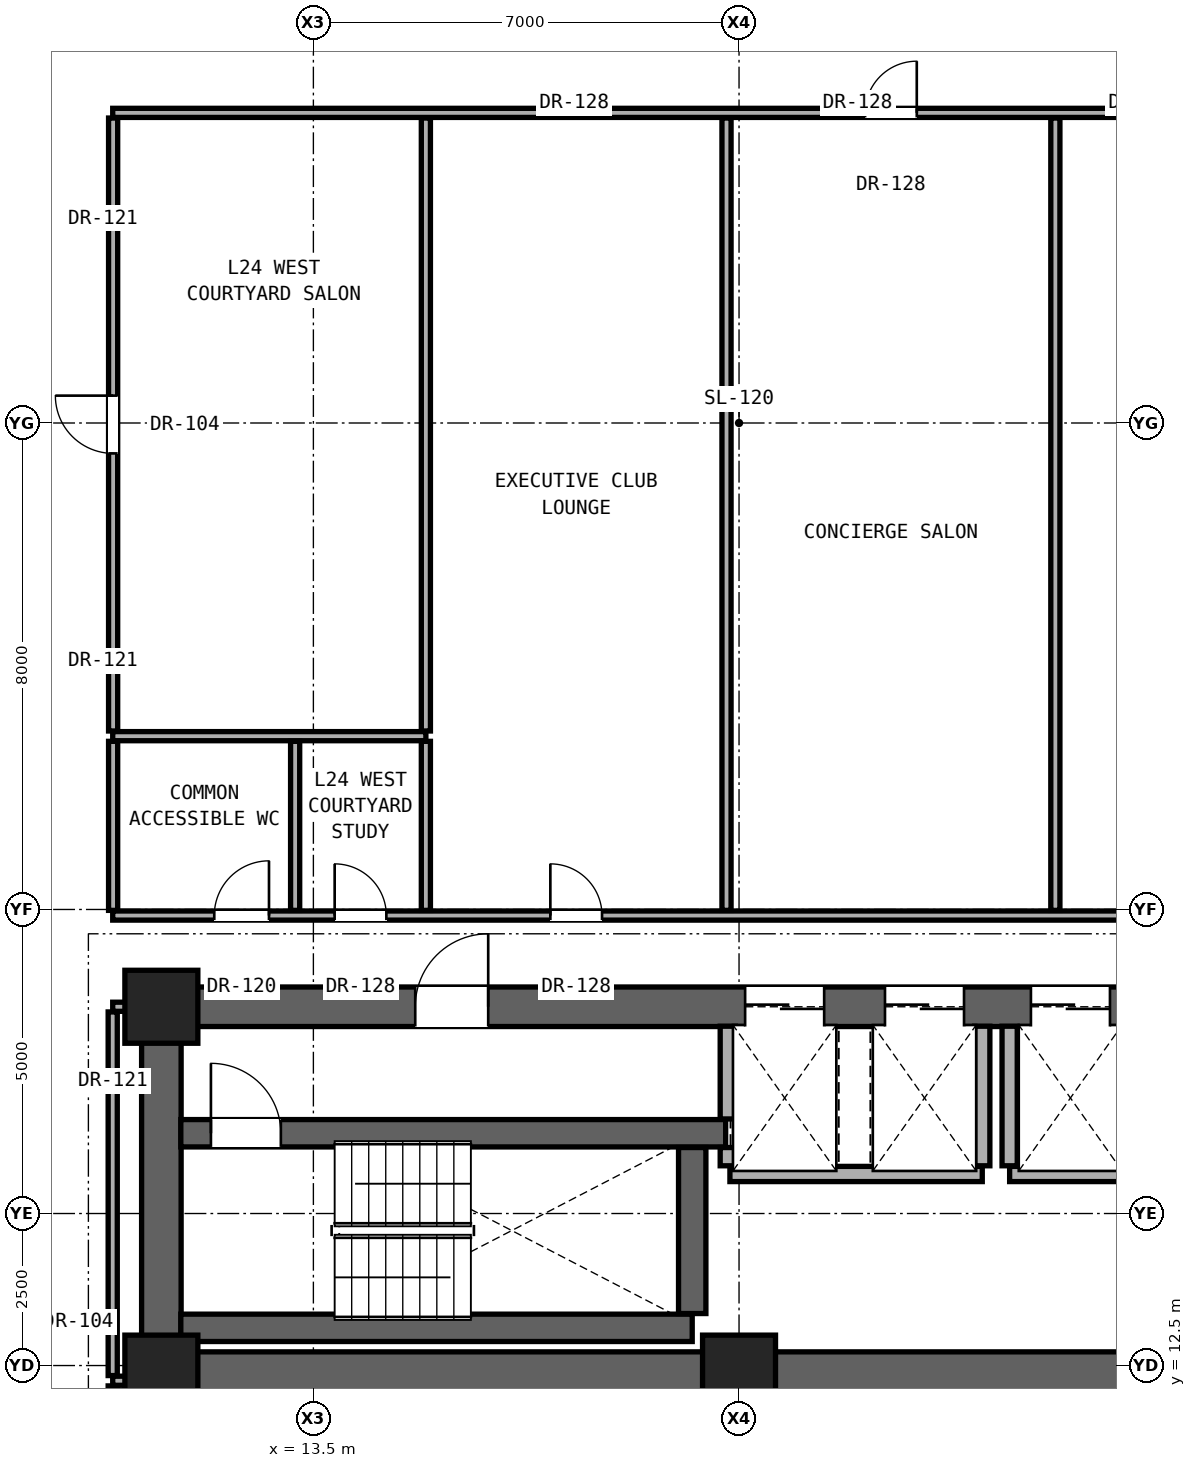
"""IFC4 building model, lengths in metres.
Left out: names, types, materials, properties, quantities, classifications, styles, units other than length and angle.
Written with IfcOpenShell. Run it as: python <this file> out.ifc"""

import sys

from ifc_helpers import new_model, si_unit, direction, frame, frame_2d, origin, origin_2d, place, context, subcontext, project, spatial, rectangle, extrude, element, fill, save


model = new_model("IFC4")
c1 = context("Model", 3, precision=1e-05, world=origin(), true_north=direction((0.0, 1.0)))
c2 = subcontext(c1, "Body", "Model", "MODEL_VIEW")
j1 = project(units=[si_unit("LENGTHUNIT", "METRE"), si_unit("PLANEANGLEUNIT", "RADIAN")], contexts=[c1])
p1 = place(None, origin())
s1 = spatial("IfcSite", under=j1, at=p1, CompositionType="ELEMENT")
p2 = place(p1, origin())
s2 = spatial("IfcBuilding", under=s1, at=p2, CompositionType="ELEMENT")
p3 = place(p2, frame((0.0, 0.0, 88.4)))
s3 = spatial("IfcBuildingStorey", under=s2, at=p3, CompositionType="ELEMENT", Elevation=88.4)
for number, where, z_axis, x_axis in (
    (1, (11.0, 12.4, 0.0), (0.0, 0.0, 1.0), (1.0, 0.0, 0.0)),
    (2, (20.5, 12.4, 0.0), (0.0, 0.0, 1.0), (1.0, 0.0, 0.0)),
    (3, (11.0, 18.4, 0.0), (0.0, 0.0, 1.0), (1.0, 0.0, 0.0)),
):
    element("IfcColumn", number, at=place(p3, frame(where, z_axis=z_axis, x_axis=x_axis)), inside=s3, PredefinedType="COLUMN", context=c2, shape_type="SweptSolid", body=[
        extrude(rectangle(XDim=1.2, YDim=1.2, at=origin_2d()), origin(), (0.0, 0.0, 1.0), 3.3),
    ])
p4 = place(p3, frame((11.0, 12.4, 0.0), z_axis=(0.0, 0.0, 1.0), x_axis=(1.0, 0.0, 0.0)))
e4 = element("IfcWall", 4, at=p4, inside=s3, PredefinedType="SHEAR", context=c2, shape_type="SweptSolid", body=[
    extrude(rectangle(XDim=19.0, YDim=0.65, at=frame_2d((9.5, 0.0))), origin(), (0.0, 0.0, 1.0), 3.08),
])
p5 = place(p3, frame((11.0, 12.4, 0.0), z_axis=(0.0, 0.0, 1.0), x_axis=(0.0, 1.0, 0.0)))
e5 = element("IfcWall", 5, at=p5, inside=s3, PredefinedType="SHEAR", context=c2, shape_type="SweptSolid", body=[
    extrude(rectangle(XDim=6.0, YDim=0.65, at=frame_2d((3.0, 0.0))), origin(), (0.0, 0.0, 1.0), 3.08),
])
p6 = place(p3, frame((11.0, 18.4, 0.0), z_axis=(0.0, 0.0, 1.0), x_axis=(1.0, 0.0, 0.0)))
e6 = element("IfcWall", 6, at=p6, inside=s3, PredefinedType="SHEAR", context=c2, shape_type="SweptSolid", body=[
    extrude(rectangle(XDim=19.0, YDim=0.65, at=frame_2d((9.5, 0.0))), origin(), (0.0, 0.0, 1.0), 3.08),
])
p7 = place(p6, frame((4.175, 0.0, 0.0)))
e7 = element("IfcOpeningElement", 7, at=p7, cuts=e6, PredefinedType="OPENING", context=c2, shape_type="SweptSolid", body=[
    extrude(rectangle(XDim=1.2, YDim=2.25, at=frame_2d((0.6, 1.125))), frame((0.0, 0.335, 0.0), z_axis=(0.0, -1.0, 0.0), x_axis=(1.0, 0.0, 0.0)), (0.0, 0.0, 1.0), 0.67),
])
p8 = place(p6, frame((9.6, 0.0, 0.0)))
e8 = element("IfcOpeningElement", 8, at=p8, cuts=e6, PredefinedType="OPENING", context=c2, shape_type="SweptSolid", body=[
    extrude(rectangle(XDim=1.3, YDim=2.3, at=frame_2d((0.65, 1.15))), frame((0.0, 0.335, 0.0), z_axis=(0.0, -1.0, 0.0), x_axis=(1.0, 0.0, 0.0)), (0.0, 0.0, 1.0), 0.67),
])
p9 = place(p6, frame((11.9, 0.0, 0.0)))
e9 = element("IfcOpeningElement", 9, at=p9, cuts=e6, PredefinedType="OPENING", context=c2, shape_type="SweptSolid", body=[
    extrude(rectangle(XDim=1.3, YDim=2.3, at=frame_2d((0.65, 1.15))), frame((0.0, 0.335, 0.0), z_axis=(0.0, -1.0, 0.0), x_axis=(1.0, 0.0, 0.0)), (0.0, 0.0, 1.0), 0.67),
])
p10 = place(p6, frame((14.3, 0.0, 0.0)))
e10 = element("IfcOpeningElement", 10, at=p10, cuts=e6, PredefinedType="OPENING", context=c2, shape_type="SweptSolid", body=[
    extrude(rectangle(XDim=1.3, YDim=2.3, at=frame_2d((0.65, 1.15))), frame((0.0, 0.335, 0.0), z_axis=(0.0, -1.0, 0.0), x_axis=(1.0, 0.0, 0.0)), (0.0, 0.0, 1.0), 0.67),
])
p11 = place(p6, frame((16.6, 0.0, 0.0)))
e11 = element("IfcOpeningElement", 11, at=p11, cuts=e6, PredefinedType="OPENING", context=c2, shape_type="SweptSolid", body=[
    extrude(rectangle(XDim=1.3, YDim=2.3, at=frame_2d((0.65, 1.15))), frame((0.0, 0.335, 0.0), z_axis=(0.0, -1.0, 0.0), x_axis=(1.0, 0.0, 0.0)), (0.0, 0.0, 1.0), 0.67),
])
p12 = place(p3, frame((10.2, 12.25, 0.0), z_axis=(0.0, 0.0, 1.0), x_axis=(1.0, 0.0, 0.0)))
e12 = element("IfcWall", 12, at=p12, inside=s3, PredefinedType="PARTITIONING", context=c2, shape_type="SweptSolid", body=[
    extrude(rectangle(XDim=0.48, YDim=0.15, at=frame_2d((0.24, 0.0))), origin(), (0.0, 0.0, 1.0), 3.08),
])
p13 = place(p3, frame((11.32, 13.12, 0.0), z_axis=(0.0, 0.0, 1.0), x_axis=(1.0, 0.0, 0.0)))
e13 = element("IfcWall", 13, at=p13, inside=s3, PredefinedType="SHEAR", context=c2, shape_type="SweptSolid", body=[
    extrude(rectangle(XDim=8.41, YDim=0.45, at=frame_2d((4.205, 0.0))), origin(), (0.0, 0.0, 1.0), 3.08),
])
p14 = place(p3, frame((20.35, 15.65, 0.0), z_axis=(0.0, 0.0, 1.0), x_axis=(1.0, 0.0, 0.0)))
e14 = element("IfcWall", 14, at=p14, inside=s3, PredefinedType="SOLIDWALL", context=c2, shape_type="SweptSolid", body=[
    extrude(rectangle(XDim=4.15, YDim=0.25, at=frame_2d((2.075, 0.0))), origin(), (0.0, 0.0, 1.0), 3.08),
])
p15 = place(p3, frame((24.95, 15.65, 0.0), z_axis=(0.0, 0.0, 1.0), x_axis=(1.0, 0.0, 0.0)))
e15 = element("IfcWall", 15, at=p15, inside=s3, PredefinedType="SOLIDWALL", context=c2, shape_type="SweptSolid", body=[
    extrude(rectangle(XDim=4.25, YDim=0.25, at=frame_2d((2.125, 0.0))), origin(), (0.0, 0.0, 1.0), 3.08),
])
p16 = place(p3, frame((11.32, 16.32, 0.0), z_axis=(0.0, 0.0, 1.0), x_axis=(1.0, 0.0, 0.0)))
e16 = element("IfcWall", 16, at=p16, inside=s3, PredefinedType="SHEAR", context=c2, shape_type="SweptSolid", body=[
    extrude(rectangle(XDim=8.96, YDim=0.45, at=frame_2d((4.48, 0.0))), origin(), (0.0, 0.0, 1.0), 3.08),
])
p17 = place(p16, frame((0.495, 0.0, 0.0)))
e17 = element("IfcOpeningElement", 17, at=p17, cuts=e16, PredefinedType="OPENING", context=c2, shape_type="SweptSolid", body=[
    extrude(rectangle(XDim=1.15, YDim=2.2, at=frame_2d((0.575, 1.1))), frame((0.0, 0.235, 0.0), z_axis=(0.0, -1.0, 0.0), x_axis=(1.0, 0.0, 0.0)), (0.0, 0.0, 1.0), 0.47),
])
p18 = place(p3, frame((10.2, 18.4, 0.0), z_axis=(0.0, 0.0, 1.0), x_axis=(1.0, 0.0, 0.0)))
e18 = element("IfcWall", 18, at=p18, inside=s3, PredefinedType="PARTITIONING", context=c2, shape_type="SweptSolid", body=[
    extrude(rectangle(XDim=0.48, YDim=0.15, at=frame_2d((0.24, 0.0))), origin(), (0.0, 0.0, 1.0), 2.456),
])
p19 = place(p3, frame((10.2, 19.9, 0.0), z_axis=(0.0, 0.0, 1.0), x_axis=(1.0, 0.0, 0.0)))
e19 = element("IfcWall", 19, at=p19, inside=s3, PredefinedType="PARTITIONING", context=c2, shape_type="SweptSolid", body=[
    extrude(rectangle(XDim=20.6, YDim=0.15, at=frame_2d((10.3, 0.0))), origin(), (0.0, 0.0, 1.0), 2.124),
])
p20 = place(p19, frame((1.67, 0.0, 0.0)))
e20 = element("IfcOpeningElement", 20, at=p20, cuts=e19, PredefinedType="OPENING", context=c2, shape_type="SweptSolid", body=[
    extrude(rectangle(XDim=0.9, YDim=2.1, at=frame_2d((0.45, 1.05))), frame((0.0, 0.085, 0.0), z_axis=(0.0, -1.0, 0.0), x_axis=(1.0, 0.0, 0.0)), (0.0, 0.0, 1.0), 0.17),
])
p21 = place(p19, frame((3.65, 0.0, 0.0)))
e21 = element("IfcOpeningElement", 21, at=p21, cuts=e19, PredefinedType="OPENING", context=c2, shape_type="SweptSolid", body=[
    extrude(rectangle(XDim=0.85, YDim=2.01, at=frame_2d((0.425, 1.005))), frame((0.0, 0.085, 0.0), z_axis=(0.0, -1.0, 0.0), x_axis=(1.0, 0.0, 0.0)), (0.0, 0.0, 1.0), 0.17),
])
p22 = place(p19, frame((7.197, 0.0, 0.0)))
e22 = element("IfcOpeningElement", 22, at=p22, cuts=e19, PredefinedType="OPENING", context=c2, shape_type="SweptSolid", body=[
    extrude(rectangle(XDim=0.85, YDim=2.01, at=frame_2d((0.425, 1.005))), frame((0.0, 0.085, 0.0), z_axis=(0.0, -1.0, 0.0), x_axis=(1.0, 0.0, 0.0)), (0.0, 0.0, 1.0), 0.17),
])
p23 = place(p3, frame((10.2, 22.85, 0.0), z_axis=(0.0, 0.0, 1.0), x_axis=(1.0, 0.0, 0.0)))
e23 = element("IfcWall", 23, at=p23, inside=s3, PredefinedType="PARTITIONING", context=c2, shape_type="SweptSolid", body=[
    extrude(rectangle(XDim=5.15, YDim=0.15, at=frame_2d((2.575, 0.0))), origin(), (0.0, 0.0, 1.0), 2.124),
])
p24 = place(p3, frame((10.2, 33.1, 0.0), z_axis=(0.0, 0.0, 1.0), x_axis=(1.0, 0.0, 0.0)))
e24 = element("IfcWall", 24, at=p24, inside=s3, PredefinedType="PARTITIONING", context=c2, shape_type="SweptSolid", body=[
    extrude(rectangle(XDim=20.6, YDim=0.15, at=frame_2d((10.3, 0.0))), origin(), (0.0, 0.0, 1.0), 2.124),
])
p25 = place(p24, frame((12.373, 0.0, 0.0)))
e25 = element("IfcOpeningElement", 25, at=p25, cuts=e24, PredefinedType="OPENING", context=c2, shape_type="SweptSolid", body=[
    extrude(rectangle(XDim=0.85, YDim=2.01, at=frame_2d((0.425, 1.005))), frame((0.0, 0.085, 0.0), z_axis=(0.0, -1.0, 0.0), x_axis=(1.0, 0.0, 0.0)), (0.0, 0.0, 1.0), 0.17),
])
p26 = place(p24, frame((17.606, 0.0, 0.0)))
e26 = element("IfcOpeningElement", 26, at=p26, cuts=e24, PredefinedType="OPENING", context=c2, shape_type="SweptSolid", body=[
    extrude(rectangle(XDim=0.85, YDim=2.01, at=frame_2d((0.425, 1.005))), frame((0.0, 0.085, 0.0), z_axis=(0.0, -1.0, 0.0), x_axis=(1.0, 0.0, 0.0)), (0.0, 0.0, 1.0), 0.17),
])
p27 = place(p3, frame((10.2, 9.47, 0.0), z_axis=(0.0, 0.0, 1.0), x_axis=(0.0, 1.0, 0.0)))
e27 = element("IfcWall", 27, at=p27, inside=s3, PredefinedType="PARTITIONING", context=c2, shape_type="SweptSolid", body=[
    extrude(rectangle(XDim=2.695, YDim=0.15, at=frame_2d((1.348, 0.0))), origin(), (0.0, 0.0, 1.0), 3.08),
])
p28 = place(p27, frame((0.823, 0.0, 0.0)))
e28 = element("IfcOpeningElement", 28, at=p28, cuts=e27, PredefinedType="OPENING", context=c2, shape_type="SweptSolid", body=[
    extrude(rectangle(XDim=1.05, YDim=2.2, at=frame_2d((0.525, 1.1))), frame((0.0, 0.085, 0.0), z_axis=(0.0, -1.0, 0.0), x_axis=(1.0, 0.0, 0.0)), (0.0, 0.0, 1.0), 0.17),
])
p29 = place(p3, frame((10.2, 12.335, 0.0), z_axis=(0.0, 0.0, 1.0), x_axis=(0.0, 1.0, 0.0)))
e29 = element("IfcWall", 29, at=p29, inside=s3, PredefinedType="PARTITIONING", context=c2, shape_type="SweptSolid", body=[
    extrude(rectangle(XDim=5.98, YDim=0.15, at=frame_2d((2.99, 0.0))), origin(), (0.0, 0.0, 1.0), 2.456),
])
p30 = place(p3, frame((10.207, 19.985, 0.0), z_axis=(0.0, 0.0, 1.0), x_axis=(0.0, 1.0, 0.0)))
e30 = element("IfcWall", 30, at=p30, inside=s3, PredefinedType="PARTITIONING", context=c2, shape_type="SweptSolid", body=[
    extrude(rectangle(XDim=2.78, YDim=0.15, at=frame_2d((1.39, 0.0))), origin(), (0.0, 0.0, 1.0), 3.08),
])
p31 = place(p3, frame((10.207, 22.935, 0.0), z_axis=(0.0, 0.0, 1.0), x_axis=(0.0, 1.0, 0.0)))
e31 = element("IfcWall", 31, at=p31, inside=s3, PredefinedType="PARTITIONING", context=c2, shape_type="SweptSolid", body=[
    extrude(rectangle(XDim=10.08, YDim=0.15, at=frame_2d((5.04, 0.0))), origin(), (0.0, 0.0, 1.0), 2.299),
])
p32 = place(p31, frame((4.565, 0.0, 0.0)))
e32 = element("IfcOpeningElement", 32, at=p32, cuts=e31, PredefinedType="OPENING", context=c2, shape_type="SweptSolid", body=[
    extrude(rectangle(XDim=0.95, YDim=2.15, at=frame_2d((0.475, 1.075))), frame((0.0, 0.085, 0.0), z_axis=(0.0, -1.0, 0.0), x_axis=(1.0, 0.0, 0.0)), (0.0, 0.0, 1.0), 0.17),
])
for number, where, z_axis, x_axis in (
    (33, (13.2, 19.985, 0.0), (0.0, 0.0, 1.0), (0.0, 1.0, 0.0)),
    (34, (15.35, 19.985, 0.0), (0.0, 0.0, 1.0), (0.0, 1.0, 0.0)),
):
    element("IfcWall", number, at=place(p3, frame(where, z_axis=z_axis, x_axis=x_axis)), inside=s3, PredefinedType="PARTITIONING", context=c2, shape_type="SweptSolid", body=[
        extrude(rectangle(XDim=2.78, YDim=0.15, at=frame_2d((1.39, 0.0))), origin(), (0.0, 0.0, 1.0), 3.08),
    ])
p33 = place(p3, frame((15.35, 22.935, 0.0), z_axis=(0.0, 0.0, 1.0), x_axis=(0.0, 1.0, 0.0)))
e35 = element("IfcWall", 35, at=p33, inside=s3, PredefinedType="PARTITIONING", context=c2, shape_type="SweptSolid", body=[
    extrude(rectangle(XDim=10.08, YDim=0.15, at=frame_2d((5.04, 0.0))), origin(), (0.0, 0.0, 1.0), 2.124),
])
p34 = place(p3, frame((19.73, 13.355, 0.0), z_axis=(0.0, 0.0, 1.0), x_axis=(0.0, 1.0, 0.0)))
e36 = element("IfcWall", 36, at=p34, inside=s3, PredefinedType="SHEAR", context=c2, shape_type="SweptSolid", body=[
    extrude(rectangle(XDim=2.73, YDim=0.45, at=frame_2d((1.365, 0.0))), origin(), (0.0, 0.0, 1.0), 3.08),
])
p35 = place(p3, frame((20.315, 15.785, 0.0), z_axis=(0.0, 0.0, 1.0), x_axis=(0.0, 1.0, 0.0)))
e37 = element("IfcWall", 37, at=p35, inside=s3, PredefinedType="SOLIDWALL", context=c2, shape_type="SweptSolid", body=[
    extrude(rectangle(XDim=0.3, YDim=0.25, at=frame_2d((0.15, 0.0))), origin(), (0.0, 0.0, 1.0), 3.08),
])
p36 = place(p3, frame((20.315, 16.555, 0.0), z_axis=(0.0, 0.0, 1.0), x_axis=(0.0, 1.0, 0.0)))
e38 = element("IfcWall", 38, at=p36, inside=s3, PredefinedType="SOLIDWALL", context=c2, shape_type="SweptSolid", body=[
    extrude(rectangle(XDim=1.525, YDim=0.25, at=frame_2d((0.763, 0.0))), origin(), (0.0, 0.0, 1.0), 3.08),
])
p37 = place(p3, frame((20.294, 19.985, 0.0), z_axis=(0.0, 0.0, 1.0), x_axis=(0.0, 1.0, 0.0)))
e39 = element("IfcWall", 39, at=p37, inside=s3, PredefinedType="PARTITIONING", context=c2, shape_type="SweptSolid", body=[
    extrude(rectangle(XDim=13.03, YDim=0.15, at=frame_2d((6.515, 0.0))), origin(), (0.0, 0.0, 1.0), 2.124),
])
for number, where, z_axis, x_axis in (
    (40, (24.5, 15.785, 0.0), (0.0, 0.0, 1.0), (0.0, 1.0, 0.0)),
    (41, (24.95, 15.785, 0.0), (0.0, 0.0, 1.0), (0.0, 1.0, 0.0)),
):
    element("IfcWall", number, at=place(p3, frame(where, z_axis=z_axis, x_axis=x_axis)), inside=s3, PredefinedType="SOLIDWALL", context=c2, shape_type="SweptSolid", body=[
        extrude(rectangle(XDim=2.295, YDim=0.25, at=frame_2d((1.147, 0.0))), origin(), (0.0, 0.0, 1.0), 3.08),
    ])
p38 = place(p3, frame((25.702, 19.985, 0.0), z_axis=(0.0, 0.0, 1.0), x_axis=(0.0, 1.0, 0.0)))
e42 = element("IfcWall", 42, at=p38, inside=s3, PredefinedType="PARTITIONING", context=c2, shape_type="SweptSolid", body=[
    extrude(rectangle(XDim=13.03, YDim=0.15, at=frame_2d((6.515, 0.0))), origin(), (0.0, 0.0, 1.0), 2.124),
])
p39 = place(p7, origin())
e43 = element("IfcDoor", 43, at=p39, inside=s3, OperationType="SINGLE_SWING_RIGHT", PredefinedType="DOOR", context=c2, shape_type="SweptSolid", body=[
    extrude(rectangle(XDim=1.2, YDim=2.25, at=frame_2d((0.6, 1.125))), frame((0.0, 0.025, 0.0), z_axis=(0.0, -1.0, 0.0), x_axis=(1.0, 0.0, 0.0)), (0.0, 0.0, 1.0), 0.05),
])
fill(e7, e43)
p40 = place(p17, origin())
e44 = element("IfcDoor", 44, at=p40, inside=s3, OperationType="SINGLE_SWING_LEFT", PredefinedType="DOOR", context=c2, shape_type="SweptSolid", body=[
    extrude(rectangle(XDim=1.15, YDim=2.2, at=frame_2d((0.575, 1.1))), frame((0.0, 0.025, 0.0), z_axis=(0.0, -1.0, 0.0), x_axis=(1.0, 0.0, 0.0)), (0.0, 0.0, 1.0), 0.05),
])
fill(e17, e44)
p41 = place(p20, origin())
e45 = element("IfcDoor", 45, at=p41, inside=s3, OperationType="SINGLE_SWING_RIGHT", PredefinedType="DOOR", context=c2, shape_type="SweptSolid", body=[
    extrude(rectangle(XDim=0.9, YDim=2.1, at=frame_2d((0.45, 1.05))), frame((0.0, 0.025, 0.0), z_axis=(0.0, -1.0, 0.0), x_axis=(1.0, 0.0, 0.0)), (0.0, 0.0, 1.0), 0.05),
])
fill(e20, e45)
p42 = place(p21, origin())
e46 = element("IfcDoor", 46, at=p42, inside=s3, OperationType="SINGLE_SWING_LEFT", PredefinedType="DOOR", context=c2, shape_type="SweptSolid", body=[
    extrude(rectangle(XDim=0.85, YDim=2.01, at=frame_2d((0.425, 1.005))), frame((0.0, 0.025, 0.0), z_axis=(0.0, -1.0, 0.0), x_axis=(1.0, 0.0, 0.0)), (0.0, 0.0, 1.0), 0.05),
])
fill(e21, e46)
p43 = place(p32, origin())
e47 = element("IfcDoor", 47, at=p43, inside=s3, OperationType="SINGLE_SWING_RIGHT", PredefinedType="DOOR", context=c2, shape_type="SweptSolid", body=[
    extrude(rectangle(XDim=0.95, YDim=2.15, at=frame_2d((0.475, 1.075))), frame((0.0, 0.025, 0.0), z_axis=(0.0, -1.0, 0.0), x_axis=(1.0, 0.0, 0.0)), (0.0, 0.0, 1.0), 0.05),
])
fill(e32, e47)
p44 = place(p22, origin())
e48 = element("IfcDoor", 48, at=p44, inside=s3, OperationType="SINGLE_SWING_LEFT", PredefinedType="DOOR", context=c2, shape_type="SweptSolid", body=[
    extrude(rectangle(XDim=0.85, YDim=2.01, at=frame_2d((0.425, 1.005))), frame((0.0, 0.025, 0.0), z_axis=(0.0, -1.0, 0.0), x_axis=(1.0, 0.0, 0.0)), (0.0, 0.0, 1.0), 0.05),
])
fill(e22, e48)
p45 = place(p25, origin())
e49 = element("IfcDoor", 49, at=p45, inside=s3, OperationType="SINGLE_SWING_RIGHT", PredefinedType="DOOR", context=c2, shape_type="SweptSolid", body=[
    extrude(rectangle(XDim=0.85, YDim=2.01, at=frame_2d((0.425, 1.005))), frame((0.0, 0.025, 0.0), z_axis=(0.0, -1.0, 0.0), x_axis=(1.0, 0.0, 0.0)), (0.0, 0.0, 1.0), 0.05),
])
fill(e25, e49)
p46 = place(p8, origin())
e50 = element("IfcDoor", 50, at=p46, inside=s3, OperationType="DOUBLE_DOOR_SLIDING", PredefinedType="DOOR", context=c2, shape_type="SweptSolid", body=[
    extrude(rectangle(XDim=1.3, YDim=2.3, at=frame_2d((0.65, 1.15))), frame((0.0, 0.025, 0.0), z_axis=(0.0, -1.0, 0.0), x_axis=(1.0, 0.0, 0.0)), (0.0, 0.0, 1.0), 0.05),
])
fill(e8, e50)
p47 = place(p9, origin())
e51 = element("IfcDoor", 51, at=p47, inside=s3, OperationType="DOUBLE_DOOR_SLIDING", PredefinedType="DOOR", context=c2, shape_type="SweptSolid", body=[
    extrude(rectangle(XDim=1.3, YDim=2.3, at=frame_2d((0.65, 1.15))), frame((0.0, 0.025, 0.0), z_axis=(0.0, -1.0, 0.0), x_axis=(1.0, 0.0, 0.0)), (0.0, 0.0, 1.0), 0.05),
])
fill(e9, e51)
p48 = place(p10, origin())
e52 = element("IfcDoor", 52, at=p48, inside=s3, OperationType="DOUBLE_DOOR_SLIDING", PredefinedType="DOOR", context=c2, shape_type="SweptSolid", body=[
    extrude(rectangle(XDim=1.3, YDim=2.3, at=frame_2d((0.65, 1.15))), frame((0.0, 0.025, 0.0), z_axis=(0.0, -1.0, 0.0), x_axis=(1.0, 0.0, 0.0)), (0.0, 0.0, 1.0), 0.05),
])
fill(e10, e52)
save(model, sys.argv[1])
